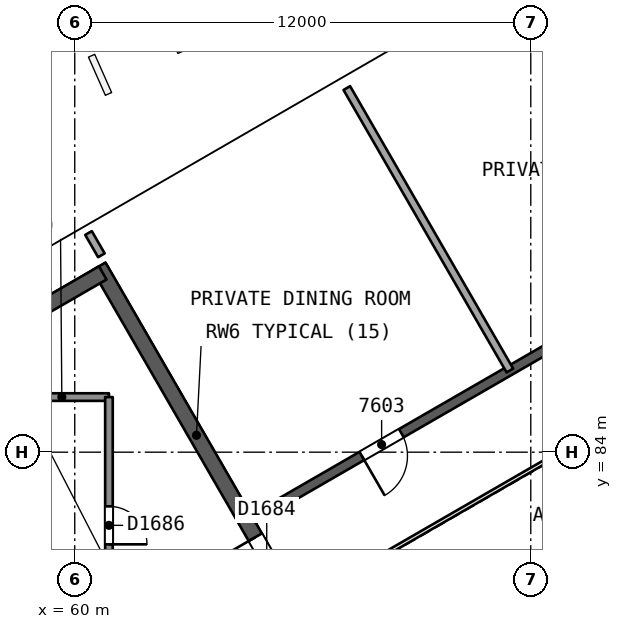
"""IFC4 building model, lengths in metres.
Left out: names, types, materials, properties, quantities, classifications, styles, units other than length and angle.
Written with IfcOpenShell. Run it as: python <this file> out.ifc"""

import sys

from ifc_helpers import new_model, si_unit, direction, frame, frame_2d, origin, place, context, subcontext, project, spatial, rectangle, extrude, element, fill, save


model = new_model("IFC4")
c1 = context("Model", 3, precision=1e-05, world=origin(), true_north=direction((0.0, 1.0)))
c2 = subcontext(c1, "Body", "Model", "MODEL_VIEW")
j1 = project(units=[si_unit("LENGTHUNIT", "METRE"), si_unit("PLANEANGLEUNIT", "RADIAN")], contexts=[c1])
p1 = place(None, origin())
s1 = spatial("IfcSite", under=j1, at=p1, CompositionType="ELEMENT")
p2 = place(p1, origin())
s2 = spatial("IfcBuilding", under=s1, at=p2, CompositionType="ELEMENT")
p3 = place(p2, frame((0.0, 0.0, 310.8)))
s3 = spatial("IfcBuildingStorey", under=s2, at=p3, CompositionType="ELEMENT", Elevation=310.8)
p4 = place(p3, frame((65.769, 80.0, 0.0), z_axis=(0.0, 0.0, 1.0), x_axis=(-0.50000177223, 0.866024380585, 0.0)))
e1 = element("IfcWall", 1, at=p4, inside=s3, PredefinedType="SHEAR", context=c2, shape_type="SweptSolid", body=[
    extrude(rectangle(XDim=10.265, YDim=0.4, at=frame_2d((5.132, 0.0))), origin(), (0.0, 0.0, 1.0), 5.0),
])
p5 = place(p4, frame((0.834, 0.0, 0.0)))
e2 = element("IfcOpeningElement", 2, at=p5, cuts=e1, PredefinedType="OPENING", context=c2, shape_type="SweptSolid", body=[
    extrude(rectangle(XDim=1.2, YDim=2.1, at=frame_2d((0.6, 1.05))), frame((0.0, 0.21, 0.0), z_axis=(0.0, -1.0, 0.0), x_axis=(1.0, 0.0, 0.0)), (0.0, 0.0, 1.0), 0.421),
])
p6 = place(p3, frame((60.737, 88.716, 0.0), z_axis=(0.0, 0.0, 1.0), x_axis=(-0.866028812667, -0.499994095595, 0.0)))
e3 = element("IfcWall", 3, at=p6, inside=s3, PredefinedType="SHEAR", context=c2, shape_type="SweptSolid", body=[
    extrude(rectangle(XDim=14.134, YDim=0.4, at=frame_2d((7.067, 0.0))), origin(), (0.0, 0.0, 1.0), 5.0),
])
p7 = place(p3, frame((78.2, 90.046, 0.0), z_axis=(0.0, 0.0, 1.0), x_axis=(-0.866026492143, -0.499998114903, 0.0)))
e4 = element("IfcWall", 4, at=p7, inside=s3, PredefinedType="SHEAR", context=c2, shape_type="SweptSolid", body=[
    extrude(rectangle(XDim=15.588, YDim=0.25, at=frame_2d((7.794, 0.0))), origin(), (0.0, 0.0, 1.0), 4.6),
])
p8 = place(p7, frame((3.297, 0.0, 0.0)))
e5 = element("IfcOpeningElement", 5, at=p8, cuts=e4, PredefinedType="OPENING", context=c2, shape_type="SweptSolid", body=[
    extrude(rectangle(XDim=1.2, YDim=2.4, at=frame_2d((0.6, 1.2))), frame((0.0, 0.135, 0.0), z_axis=(0.0, -1.0, 0.0), x_axis=(1.0, 0.0, 0.0)), (0.0, 0.0, 1.0), 0.271),
])
p9 = place(p7, frame((11.091, 0.0, 0.0)))
e6 = element("IfcOpeningElement", 6, at=p9, cuts=e4, PredefinedType="OPENING", context=c2, shape_type="SweptSolid", body=[
    extrude(rectangle(XDim=1.2, YDim=2.4, at=frame_2d((0.6, 1.2))), frame((0.0, 0.135, 0.0), z_axis=(0.0, -1.0, 0.0), x_axis=(1.0, 0.0, 0.0)), (0.0, 0.0, 1.0), 0.271),
])
p10 = place(p3, frame((67.159, 93.581, 0.0), z_axis=(0.0, 0.0, 1.0), x_axis=(0.499994148791, -0.866028781955, 0.0)))
e7 = element("IfcWall", 7, at=p10, inside=s3, PredefinedType="PARTITIONING", context=c2, shape_type="SweptSolid", body=[
    extrude(rectangle(XDim=8.582, YDim=0.2, at=frame_2d((4.291, 0.0))), origin(), (0.0, 0.0, 1.0), 4.6),
])
p11 = place(p3, frame((60.362, 89.767, 0.0), z_axis=(0.0, 0.0, 1.0), x_axis=(0.500211503058, -0.865903257996, 0.0)))
e8 = element("IfcWall", 8, at=p11, inside=s3, PredefinedType="PARTITIONING", context=c2, shape_type="SweptSolid", body=[
    extrude(rectangle(XDim=0.677, YDim=0.2, at=frame_2d((0.338, 0.0))), origin(), (0.0, 0.0, 1.0), 4.6),
])
p12 = place(p3, frame((60.9, 85.45, 0.0), z_axis=(0.0, 0.0, 1.0), x_axis=(-1.0, 0.0, 0.0)))
e9 = element("IfcWall", 9, at=p12, inside=s3, PredefinedType="SOLIDWALL", context=c2, shape_type="SweptSolid", body=[
    extrude(rectangle(XDim=2.48, YDim=0.2, at=frame_2d((1.24, 0.0))), origin(), (0.0, 0.0, 1.0), 4.6),
])
p13 = place(p3, frame((60.9, 85.45, 0.0), z_axis=(0.0, 0.0, 1.0), x_axis=(0.0, -1.0, 0.0)))
e10 = element("IfcWall", 10, at=p13, inside=s3, PredefinedType="SOLIDWALL", context=c2, shape_type="SweptSolid", body=[
    extrude(rectangle(XDim=10.9, YDim=0.2, at=frame_2d((5.45, 0.0))), origin(), (0.0, 0.0, 1.0), 4.6),
])
p14 = place(p13, frame((2.875, 0.0, 0.0)))
e11 = element("IfcOpeningElement", 11, at=p14, cuts=e10, PredefinedType="OPENING", context=c2, shape_type="SweptSolid", body=[
    extrude(rectangle(XDim=1.0, YDim=2.1, at=frame_2d((0.5, 1.05))), frame((0.0, 0.11, 0.0), z_axis=(0.0, -1.0, 0.0), x_axis=(1.0, 0.0, 0.0)), (0.0, 0.0, 1.0), 0.221),
])
p15 = place(p13, frame((7.375, 0.0, 0.0)))
e12 = element("IfcOpeningElement", 12, at=p15, cuts=e10, PredefinedType="OPENING", context=c2, shape_type="SweptSolid", body=[
    extrude(rectangle(XDim=1.0, YDim=2.1, at=frame_2d((0.5, 1.05))), frame((0.0, 0.11, 0.0), z_axis=(0.0, -1.0, 0.0), x_axis=(1.0, 0.0, 0.0)), (0.0, 0.0, 1.0), 0.221),
])
p16 = place(p3, frame((77.738, 86.846, 0.0), z_axis=(0.0, 0.0, 1.0), x_axis=(-0.866026658274, -0.499997827154, 0.0)))
e13 = element("IfcWall", 13, at=p16, inside=s3, PredefinedType="PARTITIONING", context=c2, shape_type="SweptSolid", body=[
    extrude(rectangle(XDim=11.588, YDim=0.1, at=frame_2d((5.794, 0.0))), origin(), (0.0, 0.0, 1.0), 4.6),
])
p17 = place(p9, origin())
e14 = element("IfcDoor", 14, at=p17, inside=s3, OperationType="SINGLE_SWING_RIGHT", PredefinedType="NOTDEFINED", context=c2, shape_type="SweptSolid", body=[
    extrude(rectangle(XDim=1.2, YDim=2.4, at=frame_2d((0.6, 1.2))), frame((0.0, 0.025, 0.0), z_axis=(0.0, -1.0, 0.0), x_axis=(1.0, 0.0, 0.0)), (0.0, 0.0, 1.0), 0.05),
])
fill(e6, e14)
p18 = place(p5, origin())
e15 = element("IfcDoor", 15, at=p18, inside=s3, OperationType="SINGLE_SWING_RIGHT", PredefinedType="NOTDEFINED", context=c2, shape_type="SweptSolid", body=[
    extrude(rectangle(XDim=1.2, YDim=2.1, at=frame_2d((0.6, 1.05))), frame((0.0, 0.025, 0.0), z_axis=(0.0, -1.0, 0.0), x_axis=(1.0, 0.0, 0.0)), (0.0, 0.0, 1.0), 0.05),
])
fill(e2, e15)
p19 = place(p14, origin())
e16 = element("IfcDoor", 16, at=p19, inside=s3, OperationType="SINGLE_SWING_RIGHT", PredefinedType="NOTDEFINED", context=c2, shape_type="SweptSolid", body=[
    extrude(rectangle(XDim=1.0, YDim=2.1, at=frame_2d((0.5, 1.05))), frame((0.0, 0.025, 0.0), z_axis=(0.0, -1.0, 0.0), x_axis=(1.0, 0.0, 0.0)), (0.0, 0.0, 1.0), 0.05),
])
fill(e11, e16)
save(model, sys.argv[1])
